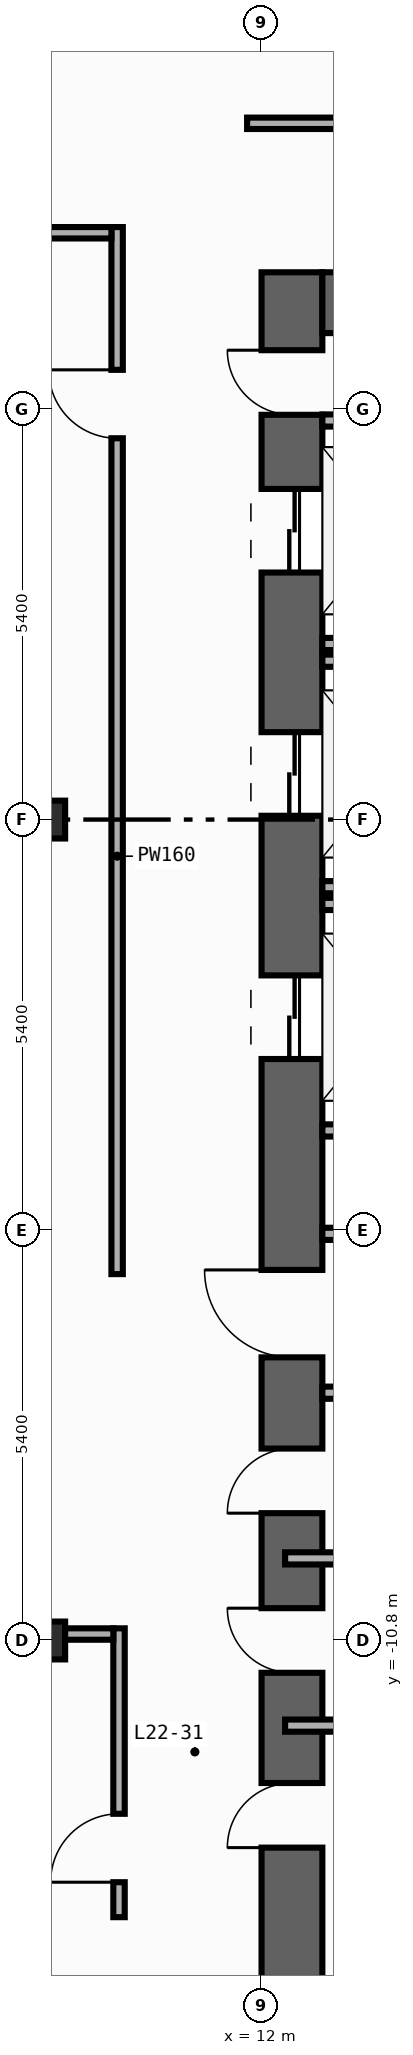
"""IFC4 building model, lengths in metres.
Left out: names, types, materials, properties, quantities, classifications, styles, units other than length and angle.
Written with IfcOpenShell. Run it as: python <this file> out.ifc"""

import sys

from ifc_helpers import new_model, si_unit, direction, frame, frame_2d, origin, origin_2d, place, context, subcontext, project, spatial, rectangle, i_section, extrude, element, fill, save


model = new_model("IFC4")
c1 = context("Model", 3, precision=1e-05, world=origin(), true_north=direction((0.0, 1.0)))
c2 = subcontext(c1, "Body", "Model", "MODEL_VIEW")
j1 = project(units=[si_unit("LENGTHUNIT", "METRE"), si_unit("PLANEANGLEUNIT", "RADIAN")], contexts=[c1])
p1 = place(None, origin())
s1 = spatial("IfcSite", under=j1, at=p1, CompositionType="ELEMENT")
p2 = place(p1, origin())
s2 = spatial("IfcBuilding", under=s1, at=p2, CompositionType="ELEMENT")
p3 = place(p2, frame((0.0, 0.0, 97.4)))
s3 = spatial("IfcBuildingStorey", under=s2, at=p3, CompositionType="ELEMENT", Elevation=97.4)
p4 = place(p3, frame((12.4, -19.8, 0.0), z_axis=(0.0, 0.0, 1.0), x_axis=(0.0, 1.0, 0.0)))
e1 = element("IfcWall", 1, at=p4, inside=s3, PredefinedType="SHEAR", context=c2, shape_type="SweptSolid", body=[
    extrude(rectangle(XDim=27.0, YDim=0.8, at=frame_2d((13.5, 0.0))), origin(), (0.0, 0.0, 1.0), 3.94),
])
p5 = place(p4, frame((23.05, 0.0, 0.0)))
e2 = element("IfcOpeningElement", 2, at=p5, cuts=e1, PredefinedType="OPENING", context=c2, shape_type="SweptSolid", body=[
    extrude(rectangle(XDim=1.1, YDim=2.2, at=frame_2d((0.55, 1.1))), frame((0.0, 0.41, 0.0), z_axis=(0.0, -1.0, 0.0), x_axis=(1.0, 0.0, 0.0)), (0.0, 0.0, 1.0), 0.82),
])
p6 = place(p4, frame((19.85, 0.0, 0.0)))
e3 = element("IfcOpeningElement", 3, at=p6, cuts=e1, PredefinedType="OPENING", context=c2, shape_type="SweptSolid", body=[
    extrude(rectangle(XDim=1.1, YDim=2.2, at=frame_2d((0.55, 1.1))), frame((0.0, 0.41, 0.0), z_axis=(0.0, -1.0, 0.0), x_axis=(1.0, 0.0, 0.0)), (0.0, 0.0, 1.0), 0.82),
])
p7 = place(p4, frame((16.65, 0.0, 0.0)))
e4 = element("IfcOpeningElement", 4, at=p7, cuts=e1, PredefinedType="OPENING", context=c2, shape_type="SweptSolid", body=[
    extrude(rectangle(XDim=1.1, YDim=2.2, at=frame_2d((0.55, 1.1))), frame((0.0, 0.41, 0.0), z_axis=(0.0, -1.0, 0.0), x_axis=(1.0, 0.0, 0.0)), (0.0, 0.0, 1.0), 0.82),
])
p8 = place(p4, frame((6.275, 0.0, 0.0)))
e5 = element("IfcOpeningElement", 5, at=p8, cuts=e1, PredefinedType="OPENING", context=c2, shape_type="SweptSolid", body=[
    extrude(rectangle(XDim=0.85, YDim=2.1, at=frame_2d((0.425, 1.05))), frame((0.0, 0.41, 0.0), z_axis=(0.0, -1.0, 0.0), x_axis=(1.0, 0.0, 0.0)), (0.0, 0.0, 1.0), 0.82),
])
p9 = place(p4, frame((8.575, 0.0, 0.0)))
e6 = element("IfcOpeningElement", 6, at=p9, cuts=e1, PredefinedType="OPENING", context=c2, shape_type="SweptSolid", body=[
    extrude(rectangle(XDim=0.85, YDim=2.1, at=frame_2d((0.425, 1.05))), frame((0.0, 0.41, 0.0), z_axis=(0.0, -1.0, 0.0), x_axis=(1.0, 0.0, 0.0)), (0.0, 0.0, 1.0), 0.82),
])
p10 = place(p4, frame((10.675, 0.0, 0.0)))
e7 = element("IfcOpeningElement", 7, at=p10, cuts=e1, PredefinedType="OPENING", context=c2, shape_type="SweptSolid", body=[
    extrude(rectangle(XDim=0.85, YDim=2.1, at=frame_2d((0.425, 1.05))), frame((0.0, 0.41, 0.0), z_axis=(0.0, -1.0, 0.0), x_axis=(1.0, 0.0, 0.0)), (0.0, 0.0, 1.0), 0.82),
])
p11 = place(p4, frame((12.725, 0.0, 0.0)))
e8 = element("IfcOpeningElement", 8, at=p11, cuts=e1, PredefinedType="OPENING", context=c2, shape_type="SweptSolid", body=[
    extrude(rectangle(XDim=1.15, YDim=2.2, at=frame_2d((0.575, 1.1))), frame((0.0, 0.41, 0.0), z_axis=(0.0, -1.0, 0.0), x_axis=(1.0, 0.0, 0.0)), (0.0, 0.0, 1.0), 0.82),
])
p12 = place(p4, frame((25.125, 0.0, 0.0)))
e9 = element("IfcOpeningElement", 9, at=p12, cuts=e1, PredefinedType="OPENING", context=c2, shape_type="SweptSolid", body=[
    extrude(rectangle(XDim=0.85, YDim=2.1, at=frame_2d((0.425, 1.05))), frame((0.0, 0.41, 0.0), z_axis=(0.0, -1.0, 0.0), x_axis=(1.0, 0.0, 0.0)), (0.0, 0.0, 1.0), 0.82),
])
p13 = place(p3, frame((12.8, 6.8, 0.0), z_axis=(0.0, 0.0, 1.0), x_axis=(1.0, 0.0, 0.0)))
e10 = element("IfcWall", 10, at=p13, inside=s3, PredefinedType="SHEAR", context=c2, shape_type="SweptSolid", body=[
    extrude(rectangle(XDim=6.8, YDim=0.8, at=frame_2d((3.4, 0.0))), origin(), (0.0, 0.0, 1.0), 3.94),
])
for number, where, z_axis, x_axis in (
    (11, (9.2, -10.8, 0.0), (0.0, 0.0, 1.0), (1.0, 0.0, 0.0)),
    (12, (9.2, 0.0, 0.0), (0.0, 0.0, 1.0), (1.0, 0.0, 0.0)),
):
    element("IfcColumn", number, at=place(p3, frame(where, z_axis=z_axis, x_axis=x_axis)), inside=s3, PredefinedType="COLUMN", context=c2, shape_type="SweptSolid", body=[
        extrude(i_section(OverallWidth=0.432, OverallDepth=0.498, WebThickness=0.045, FlangeThickness=0.07, FilletRadius=0.022, at=origin_2d()), origin(), (0.0, 0.0, 1.0), 4.2),
    ])
for number, where, z_axis, x_axis in (
    (13, (12.8, 2.31, 0.0), (0.0, 0.0, 1.0), (1.0, 0.0, 0.0)),
    (14, (12.8, -0.89, 0.0), (0.0, 0.0, 1.0), (1.0, 0.0, 0.0)),
    (15, (12.8, 2.09, 0.0), (0.0, 0.0, 1.0), (1.0, 0.0, 0.0)),
    (16, (12.8, -4.09, 0.0), (0.0, 0.0, 1.0), (1.0, 0.0, 0.0)),
    (17, (12.8, -1.11, 0.0), (0.0, 0.0, 1.0), (1.0, 0.0, 0.0)),
):
    element("IfcWall", number, at=place(p3, frame(where, z_axis=z_axis, x_axis=x_axis)), inside=s3, PredefinedType="STANDARD", context=c2, shape_type="SweptSolid", body=[
        extrude(rectangle(XDim=2.19, YDim=0.16, at=frame_2d((1.095, 0.0))), origin(), (0.0, 0.0, 1.0), 3.94),
    ])
for number, where, z_axis, x_axis in (
    (18, (12.8, -5.45, 0.0), (0.0, 0.0, 1.0), (1.0, 0.0, 0.0)),
    (19, (12.8, -7.54, 0.0), (0.0, 0.0, 1.0), (1.0, 0.0, 0.0)),
    (20, (12.8, 5.25, 0.0), (0.0, 0.0, 1.0), (1.0, 0.0, 0.0)),
):
    element("IfcWall", number, at=place(p3, frame(where, z_axis=z_axis, x_axis=x_axis)), inside=s3, PredefinedType="STANDARD", context=c2, shape_type="SweptSolid", body=[
        extrude(rectangle(XDim=2.6, YDim=0.16, at=frame_2d((1.3, 0.0))), origin(), (0.0, 0.0, 1.0), 3.94),
    ])
for number, where, z_axis, x_axis in (
    (21, (12.31, -11.92, 0.0), (0.0, 0.0, 1.0), (1.0, 0.0, 0.0)),
    (22, (12.31, -9.72, 0.0), (0.0, 0.0, 1.0), (1.0, 0.0, 0.0)),
):
    element("IfcWall", number, at=place(p3, frame(where, z_axis=z_axis, x_axis=x_axis)), inside=s3, PredefinedType="PARTITIONING", context=c2, shape_type="SweptSolid", body=[
        extrude(rectangle(XDim=3.065, YDim=0.16, at=frame_2d((1.532, 0.0))), origin(), (0.0, 0.0, 1.0), 3.94),
    ])
p14 = place(p3, frame((10.1, -5.98, 0.0), z_axis=(0.0, 0.0, 1.0), x_axis=(0.0, 1.0, 0.0)))
e23 = element("IfcWall", 23, at=p14, inside=s3, PredefinedType="PARTITIONING", context=c2, shape_type="SweptSolid", body=[
    extrude(rectangle(XDim=13.775, YDim=0.15, at=frame_2d((6.887, 0.0))), origin(), (0.0, 0.0, 1.0), 3.94),
])
p15 = place(p14, frame((10.997, 0.0, 0.0)))
e24 = element("IfcOpeningElement", 24, at=p15, cuts=e23, PredefinedType="OPENING", context=c2, shape_type="SweptSolid", body=[
    extrude(rectangle(XDim=0.9, YDim=2.15, at=frame_2d((0.45, 1.075))), frame((0.0, 0.085, 0.0), z_axis=(0.0, -1.0, 0.0), x_axis=(1.0, 0.0, 0.0)), (0.0, 0.0, 1.0), 0.17),
])
p16 = place(p3, frame((10.125, -14.44, 0.0), z_axis=(0.0, 0.0, 1.0), x_axis=(0.0, 1.0, 0.0)))
e25 = element("IfcWall", 25, at=p16, inside=s3, PredefinedType="PARTITIONING", context=c2, shape_type="SweptSolid", body=[
    extrude(rectangle(XDim=3.8, YDim=0.15, at=frame_2d((1.9, 0.0))), origin(), (0.0, 0.0, 1.0), 3.94),
])
p17 = place(p16, frame((0.46, 0.0, 0.0)))
e26 = element("IfcOpeningElement", 26, at=p17, cuts=e25, PredefinedType="OPENING", context=c2, shape_type="SweptSolid", body=[
    extrude(rectangle(XDim=0.9, YDim=2.15, at=frame_2d((0.45, 1.075))), frame((0.0, 0.085, 0.0), z_axis=(0.0, -1.0, 0.0), x_axis=(1.0, 0.0, 0.0)), (0.0, 0.0, 1.0), 0.17),
])
p18 = place(p3, frame((-2.62, 7.72, 0.0), z_axis=(0.0, 0.0, 1.0), x_axis=(1.0, 0.0, 0.0)))
e27 = element("IfcWall", 27, at=p18, inside=s3, PredefinedType="PARTITIONING", context=c2, shape_type="SweptSolid", body=[
    extrude(rectangle(XDim=12.645, YDim=0.15, at=frame_2d((6.323, 0.0))), origin(), (0.0, 0.0, 1.0), 3.94),
])
p19 = place(p18, frame((2.264, 0.0, 0.0)))
e28 = element("IfcOpeningElement", 28, at=p19, cuts=e27, PredefinedType="OPENING", context=c2, shape_type="SweptSolid", body=[
    extrude(rectangle(XDim=0.9, YDim=2.15, at=frame_2d((0.45, 1.075))), frame((0.0, 0.085, 0.0), z_axis=(0.0, -1.0, 0.0), x_axis=(1.0, 0.0, 0.0)), (0.0, 0.0, 1.0), 0.17),
])
p20 = place(p3, frame((-0.015, -10.715, 0.0), z_axis=(0.0, 0.0, 1.0), x_axis=(1.0, 0.0, 0.0)))
e29 = element("IfcWall", 29, at=p20, inside=s3, PredefinedType="PARTITIONING", context=c2, shape_type="SweptSolid", body=[
    extrude(rectangle(XDim=10.065, YDim=0.15, at=frame_2d((5.032, 0.0))), origin(), (0.0, 0.0, 1.0), 3.24),
])
p21 = place(p20, frame((1.063, 0.0, 0.0)))
e30 = element("IfcOpeningElement", 30, at=p21, cuts=e29, PredefinedType="OPENING", context=c2, shape_type="SweptSolid", body=[
    extrude(rectangle(XDim=0.9, YDim=2.15, at=frame_2d((0.45, 1.075))), frame((0.0, 0.085, 0.0), z_axis=(0.0, -1.0, 0.0), x_axis=(1.0, 0.0, 0.0)), (0.0, 0.0, 1.0), 0.17),
])
p22 = place(p3, frame((11.81, 9.16, 0.0), z_axis=(0.0, 0.0, 1.0), x_axis=(1.0, 0.0, 0.0)))
e31 = element("IfcWall", 31, at=p22, inside=s3, PredefinedType="PARTITIONING", context=c2, shape_type="SweptSolid", body=[
    extrude(rectangle(XDim=8.83, YDim=0.15, at=frame_2d((4.415, 0.0))), origin(), (0.0, 0.0, 1.0), 3.94),
])
p23 = place(p22, frame((5.067, 0.0, 0.0)))
e32 = element("IfcOpeningElement", 32, at=p23, cuts=e31, PredefinedType="OPENING", context=c2, shape_type="SweptSolid", body=[
    extrude(rectangle(XDim=0.9, YDim=2.15, at=frame_2d((0.45, 1.075))), frame((0.0, 0.085, 0.0), z_axis=(0.0, -1.0, 0.0), x_axis=(1.0, 0.0, 0.0)), (0.0, 0.0, 1.0), 0.17),
])
p24 = place(p5, origin())
e33 = element("IfcDoor", 33, at=p24, inside=s3, OperationType="DOUBLE_DOOR_SLIDING", PredefinedType="DOOR", context=c2, shape_type="SweptSolid", body=[
    extrude(rectangle(XDim=1.1, YDim=2.2, at=frame_2d((0.55, 1.1))), frame((0.0, 0.025, 0.0), z_axis=(0.0, -1.0, 0.0), x_axis=(1.0, 0.0, 0.0)), (0.0, 0.0, 1.0), 0.05),
])
fill(e2, e33)
p25 = place(p6, origin())
e34 = element("IfcDoor", 34, at=p25, inside=s3, OperationType="DOUBLE_DOOR_SLIDING", PredefinedType="DOOR", context=c2, shape_type="SweptSolid", body=[
    extrude(rectangle(XDim=1.1, YDim=2.2, at=frame_2d((0.55, 1.1))), frame((0.0, 0.025, 0.0), z_axis=(0.0, -1.0, 0.0), x_axis=(1.0, 0.0, 0.0)), (0.0, 0.0, 1.0), 0.05),
])
fill(e3, e34)
p26 = place(p7, origin())
e35 = element("IfcDoor", 35, at=p26, inside=s3, OperationType="DOUBLE_DOOR_SLIDING", PredefinedType="DOOR", context=c2, shape_type="SweptSolid", body=[
    extrude(rectangle(XDim=1.1, YDim=2.2, at=frame_2d((0.55, 1.1))), frame((0.0, 0.025, 0.0), z_axis=(0.0, -1.0, 0.0), x_axis=(1.0, 0.0, 0.0)), (0.0, 0.0, 1.0), 0.05),
])
fill(e4, e35)
p27 = place(p8, origin())
e36 = element("IfcDoor", 36, at=p27, inside=s3, OperationType="SINGLE_SWING_LEFT", PredefinedType="DOOR", context=c2, shape_type="SweptSolid", body=[
    extrude(rectangle(XDim=0.85, YDim=2.1, at=frame_2d((0.425, 1.05))), frame((0.0, 0.025, 0.0), z_axis=(0.0, -1.0, 0.0), x_axis=(1.0, 0.0, 0.0)), (0.0, 0.0, 1.0), 0.05),
])
fill(e5, e36)
p28 = place(p9, origin())
e37 = element("IfcDoor", 37, at=p28, inside=s3, OperationType="SINGLE_SWING_RIGHT", PredefinedType="DOOR", context=c2, shape_type="SweptSolid", body=[
    extrude(rectangle(XDim=0.85, YDim=2.1, at=frame_2d((0.425, 1.05))), frame((0.0, 0.025, 0.0), z_axis=(0.0, -1.0, 0.0), x_axis=(1.0, 0.0, 0.0)), (0.0, 0.0, 1.0), 0.05),
])
fill(e6, e37)
p29 = place(p10, origin())
e38 = element("IfcDoor", 38, at=p29, inside=s3, OperationType="SINGLE_SWING_LEFT", PredefinedType="DOOR", context=c2, shape_type="SweptSolid", body=[
    extrude(rectangle(XDim=0.85, YDim=2.1, at=frame_2d((0.425, 1.05))), frame((0.0, 0.025, 0.0), z_axis=(0.0, -1.0, 0.0), x_axis=(1.0, 0.0, 0.0)), (0.0, 0.0, 1.0), 0.05),
])
fill(e7, e38)
p30 = place(p11, origin())
e39 = element("IfcDoor", 39, at=p30, inside=s3, OperationType="SINGLE_SWING_RIGHT", PredefinedType="DOOR", context=c2, shape_type="SweptSolid", body=[
    extrude(rectangle(XDim=1.15, YDim=2.2, at=frame_2d((0.575, 1.1))), frame((0.0, 0.025, 0.0), z_axis=(0.0, -1.0, 0.0), x_axis=(1.0, 0.0, 0.0)), (0.0, 0.0, 1.0), 0.05),
])
fill(e8, e39)
p31 = place(p12, origin())
e40 = element("IfcDoor", 40, at=p31, inside=s3, OperationType="SINGLE_SWING_RIGHT", PredefinedType="DOOR", context=c2, shape_type="SweptSolid", body=[
    extrude(rectangle(XDim=0.85, YDim=2.1, at=frame_2d((0.425, 1.05))), frame((0.0, 0.025, 0.0), z_axis=(0.0, -1.0, 0.0), x_axis=(1.0, 0.0, 0.0)), (0.0, 0.0, 1.0), 0.05),
])
fill(e9, e40)
p32 = place(p15, origin())
e41 = element("IfcDoor", 41, at=p32, inside=s3, OperationType="SINGLE_SWING_RIGHT", PredefinedType="DOOR", context=c2, shape_type="SweptSolid", body=[
    extrude(rectangle(XDim=0.9, YDim=2.15, at=frame_2d((0.45, 1.075))), frame((0.0, 0.025, 0.0), z_axis=(0.0, -1.0, 0.0), x_axis=(1.0, 0.0, 0.0)), (0.0, 0.0, 1.0), 0.05),
])
fill(e24, e41)
p33 = place(p17, origin())
e42 = element("IfcDoor", 42, at=p33, inside=s3, OperationType="SINGLE_SWING_LEFT", PredefinedType="DOOR", context=c2, shape_type="SweptSolid", body=[
    extrude(rectangle(XDim=0.9, YDim=2.15, at=frame_2d((0.45, 1.075))), frame((0.0, 0.025, 0.0), z_axis=(0.0, -1.0, 0.0), x_axis=(1.0, 0.0, 0.0)), (0.0, 0.0, 1.0), 0.05),
])
fill(e26, e42)
save(model, sys.argv[1])
